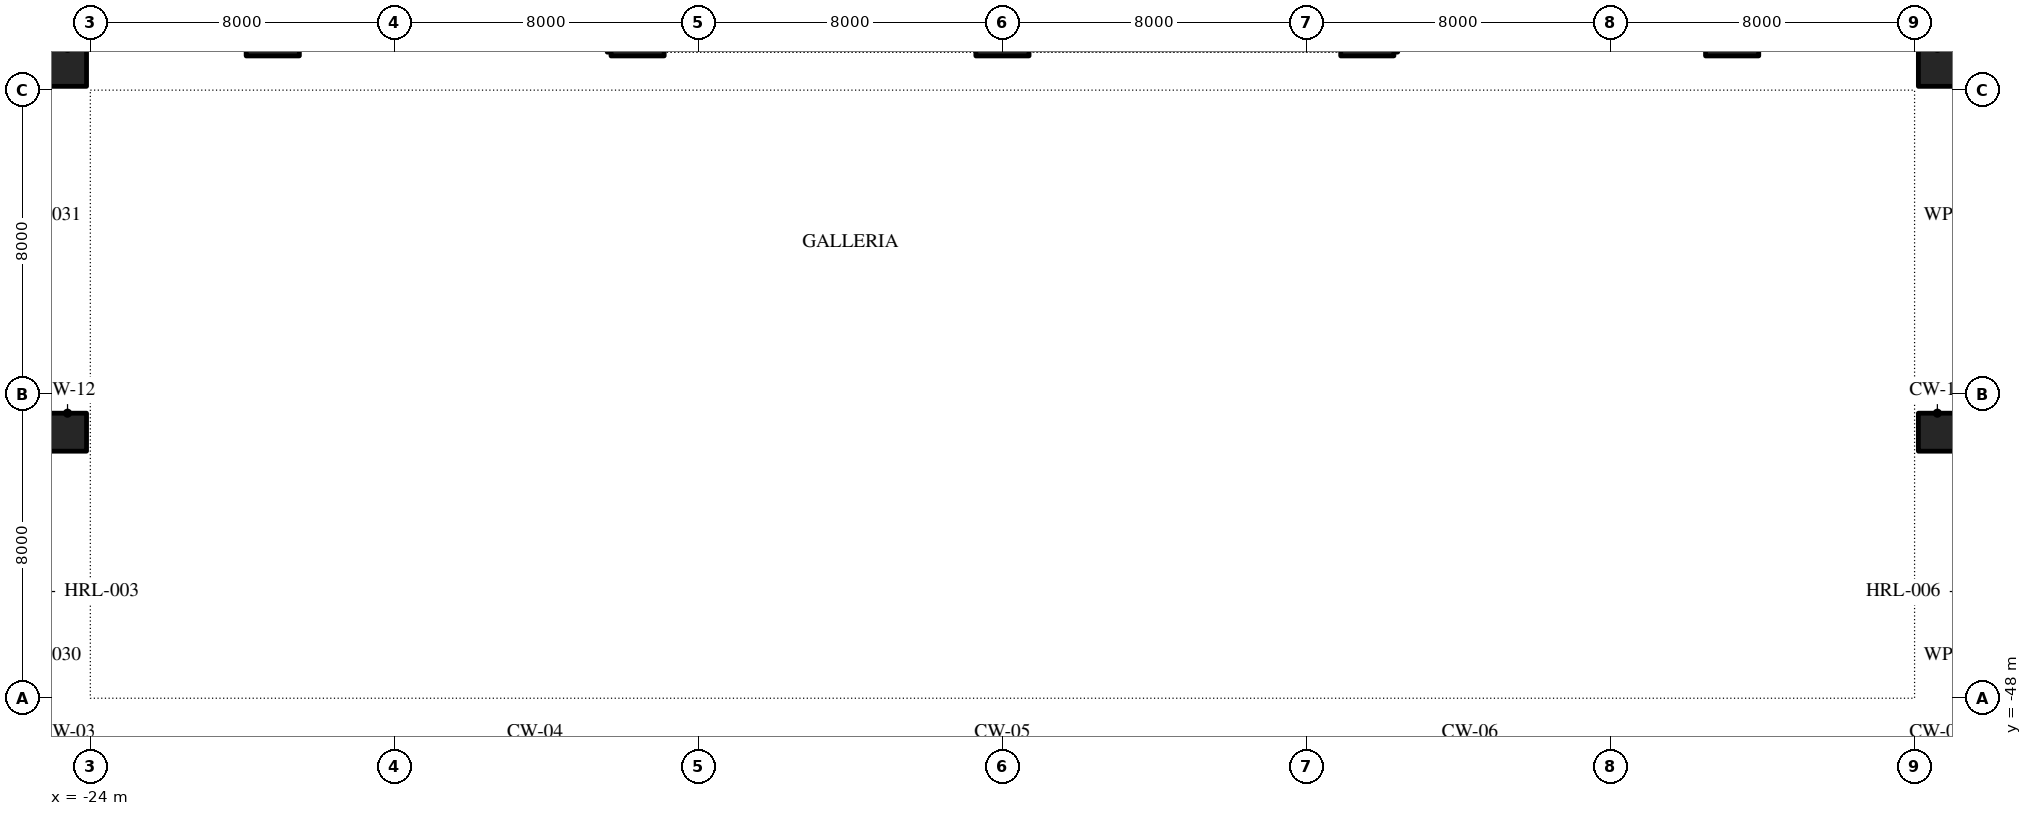
"""IFC4 building model, lengths in metres.
Left out: names, types, materials, properties, quantities, classifications, styles, units other than length and angle.
Written with IfcOpenShell. Run it as: python <this file> out.ifc"""

import sys

from ifc_helpers import new_model, si_unit, direction, frame, origin, origin_2d, place, context, subcontext, project, spatial, rectangle, extrude, element, save


model = new_model("IFC4")
c1 = context("Model", 3, precision=1e-05, world=origin(), true_north=direction((0.0, 1.0)))
c2 = subcontext(c1, "Body", "Model", "MODEL_VIEW")
j1 = project(units=[si_unit("LENGTHUNIT", "METRE"), si_unit("PLANEANGLEUNIT", "RADIAN")], contexts=[c1])
p1 = place(None, origin())
s1 = spatial("IfcSite", under=j1, at=p1, CompositionType="ELEMENT")
p2 = place(p1, origin())
s2 = spatial("IfcBuilding", under=s1, at=p2, CompositionType="ELEMENT")
p3 = place(p2, origin())
s3 = spatial("IfcBuildingStorey", under=s2, at=p3, CompositionType="ELEMENT", Elevation=0.0)
for number, where, z_axis, x_axis in (
    (1, (-24.6, -41.0, 0.0), (0.0, 0.0, 1.0), (1.0, 0.0, 0.0)),
    (2, (24.6, -41.0, 0.0), (0.0, 0.0, 1.0), (1.0, 0.0, 0.0)),
    (3, (-24.6, -31.4, 0.0), (0.0, 0.0, 1.0), (1.0, 0.0, 0.0)),
    (4, (24.6, -31.4, 0.0), (0.0, 0.0, 1.0), (1.0, 0.0, 0.0)),
):
    element("IfcColumn", number, at=place(p3, frame(where, z_axis=z_axis, x_axis=x_axis)), inside=s3, PredefinedType="COLUMN", context=c2, shape_type="SweptSolid", body=[
        extrude(rectangle(XDim=1.0, YDim=1.0, at=origin_2d()), origin(), (0.0, 0.0, 1.0), 8.0),
    ])
for number, where, z_axis, x_axis in (
    (5, (-19.2, -30.4, 0.0), (0.0, 0.0, 1.0), (1.0, 0.0, 0.0)),
    (6, (-9.6, -30.4, 0.0), (0.0, 0.0, 1.0), (1.0, 0.0, 0.0)),
    (7, (0.0, -30.4, 0.0), (0.0, 0.0, 1.0), (1.0, 0.0, 0.0)),
    (8, (9.6, -30.4, 0.0), (0.0, 0.0, 1.0), (1.0, 0.0, 0.0)),
    (9, (19.2, -30.4, 0.0), (0.0, 0.0, 1.0), (1.0, 0.0, 0.0)),
):
    element("IfcColumn", number, at=place(p3, frame(where, z_axis=z_axis, x_axis=x_axis)), inside=s3, PredefinedType="COLUMN", context=c2, shape_type="SweptSolid", body=[
        extrude(rectangle(XDim=1.4, YDim=1.4, at=origin_2d()), origin(), (0.0, 0.0, 1.0), 8.0),
    ])
save(model, sys.argv[1])
